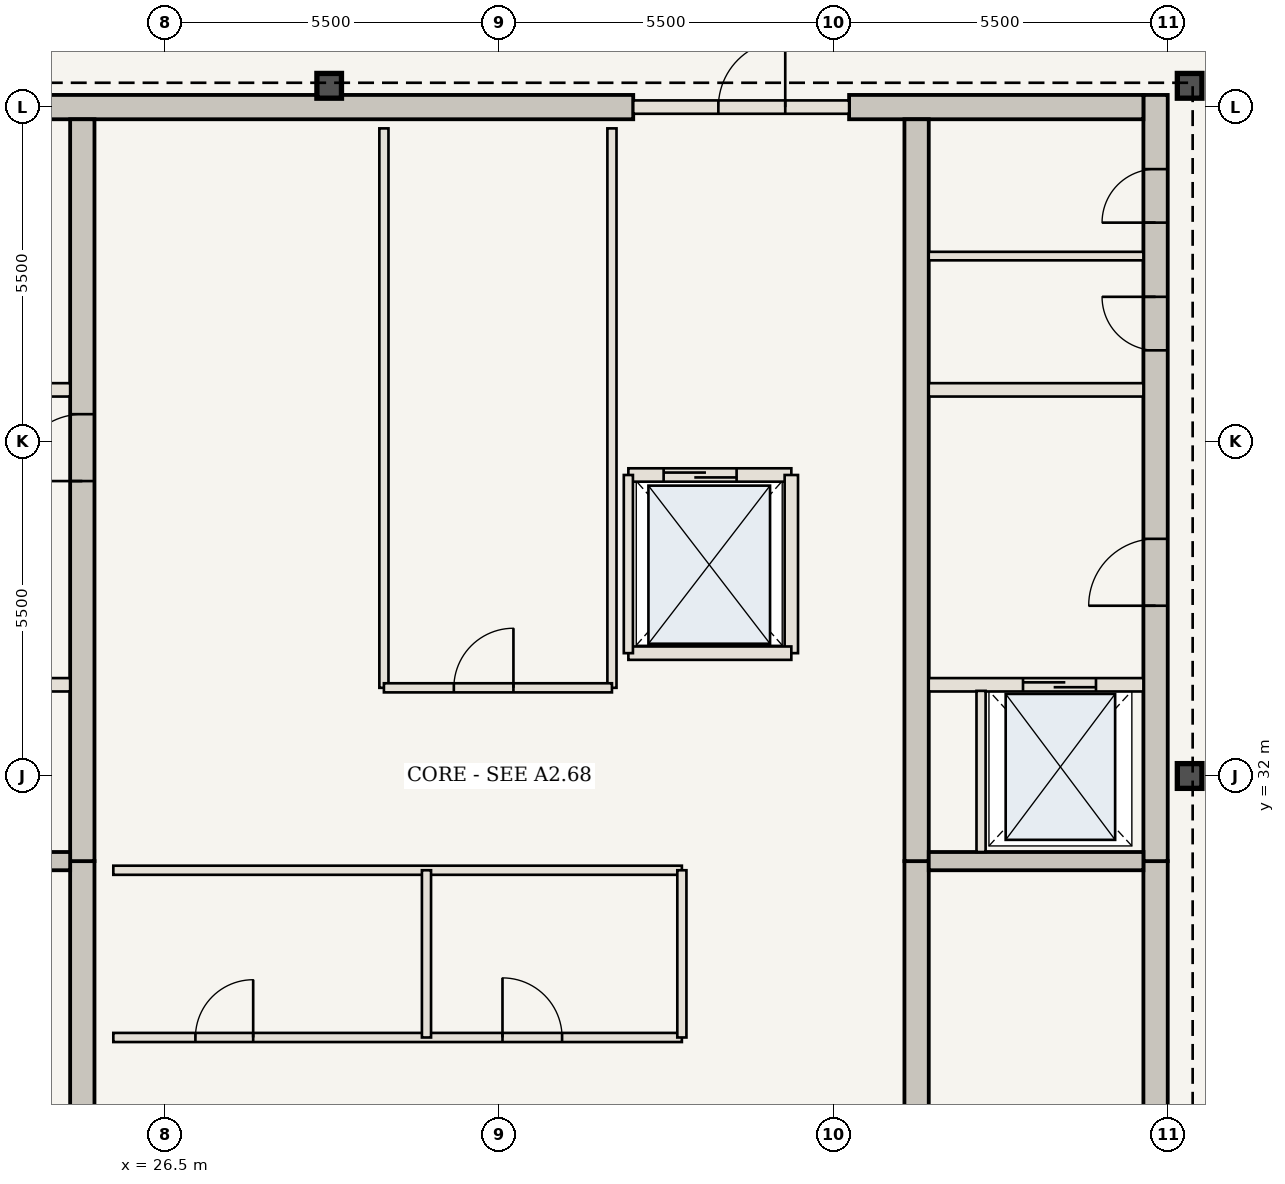
"""IFC4 building model, lengths in metres.
Left out: names, types, materials, properties, quantities, classifications, styles, units other than length and angle.
Written with IfcOpenShell. Run it as: python <this file> out.ifc"""

import sys

from ifc_helpers import new_model, si_unit, direction, frame, frame_2d, origin, origin_2d, place, context, subcontext, project, spatial, rectangle, i_section, extrude, element, fill, save


model = new_model("IFC4")
c1 = context("Model", 3, precision=1e-05, world=origin(), true_north=direction((0.0, 1.0)))
c2 = subcontext(c1, "Body", "Model", "MODEL_VIEW")
j1 = project(units=[si_unit("LENGTHUNIT", "METRE"), si_unit("PLANEANGLEUNIT", "RADIAN")], contexts=[c1])
p1 = place(None, origin())
s1 = spatial("IfcSite", under=j1, at=p1, CompositionType="ELEMENT")
p2 = place(p1, origin())
s2 = spatial("IfcBuilding", under=s1, at=p2, CompositionType="ELEMENT")
p3 = place(p2, frame((0.0, 0.0, 322.35)))
s3 = spatial("IfcBuildingStorey", under=s2, at=p3, CompositionType="ELEMENT", Elevation=322.35)
p4 = place(p3, frame((42.79, 20.75, 0.0), z_axis=(0.0, 0.0, 1.0), x_axis=(0.0, 1.0, 0.0)))
e1 = element("IfcWall", 1, at=p4, inside=s3, PredefinedType="SHEAR", context=c2, shape_type="SweptSolid", body=[
    extrude(rectangle(XDim=9.85, YDim=0.4, at=frame_2d((4.925, 0.0))), origin(), (0.0, 0.0, 1.0), 4.55),
])
p5 = place(p4, frame((1.0, 0.0, 0.0)))
e2 = element("IfcOpeningElement", 2, at=p5, cuts=e1, PredefinedType="OPENING", context=c2, shape_type="SweptSolid", body=[
    extrude(rectangle(XDim=1.15, YDim=2.15, at=frame_2d((0.575, 1.075))), frame((0.0, 0.21, 0.0), z_axis=(0.0, -1.0, 0.0), x_axis=(1.0, 0.0, 0.0)), (0.0, 0.0, 1.0), 0.42),
])
p6 = place(p3, frame((42.79, 30.6, 0.0), z_axis=(0.0, 0.0, 1.0), x_axis=(0.0, 1.0, 0.0)))
e3 = element("IfcWall", 3, at=p6, inside=s3, PredefinedType="SHEAR", context=c2, shape_type="SweptSolid", body=[
    extrude(rectangle(XDim=12.6, YDim=0.4, at=frame_2d((6.3, 0.0))), origin(), (0.0, 0.0, 1.0), 4.55),
])
p7 = place(p6, frame((4.2, 0.0, 0.0)))
e4 = element("IfcOpeningElement", 4, at=p7, cuts=e3, PredefinedType="OPENING", context=c2, shape_type="SweptSolid", body=[
    extrude(rectangle(XDim=1.1, YDim=2.15, at=frame_2d((0.55, 1.075))), frame((0.0, 0.21, 0.0), z_axis=(0.0, -1.0, 0.0), x_axis=(1.0, 0.0, 0.0)), (0.0, 0.0, 1.0), 0.42),
])
p8 = place(p6, frame((8.4, 0.0, 0.0)))
e5 = element("IfcOpeningElement", 5, at=p8, cuts=e3, PredefinedType="OPENING", context=c2, shape_type="SweptSolid", body=[
    extrude(rectangle(XDim=0.88, YDim=2.1, at=frame_2d((0.44, 1.05))), frame((0.0, 0.21, 0.0), z_axis=(0.0, -1.0, 0.0), x_axis=(1.0, 0.0, 0.0)), (0.0, 0.0, 1.0), 0.42),
])
p9 = place(p6, frame((10.5, 0.0, 0.0)))
e6 = element("IfcOpeningElement", 6, at=p9, cuts=e3, PredefinedType="OPENING", context=c2, shape_type="SweptSolid", body=[
    extrude(rectangle(XDim=0.88, YDim=2.1, at=frame_2d((0.44, 1.05))), frame((0.0, 0.21, 0.0), z_axis=(0.0, -1.0, 0.0), x_axis=(1.0, 0.0, 0.0)), (0.0, 0.0, 1.0), 0.42),
])
p10 = place(p3, frame((21.41, 43.0, 0.0), z_axis=(0.0, 0.0, 1.0), x_axis=(1.0, 0.0, 0.0)))
e7 = element("IfcWall", 7, at=p10, inside=s3, PredefinedType="SHEAR", context=c2, shape_type="SweptSolid", body=[
    extrude(rectangle(XDim=12.79, YDim=0.4, at=frame_2d((6.395, 0.0))), origin(), (0.0, 0.0, 1.0), 4.55),
])
p11 = place(p3, frame((37.75, 43.0, 0.0), z_axis=(0.0, 0.0, 1.0), x_axis=(1.0, 0.0, 0.0)))
e8 = element("IfcWall", 8, at=p11, inside=s3, PredefinedType="SHEAR", context=c2, shape_type="SweptSolid", body=[
    extrude(rectangle(XDim=4.84, YDim=0.4, at=frame_2d((2.42, 0.0))), origin(), (0.0, 0.0, 1.0), 4.55),
])
p12 = place(p3, frame((25.14, 21.15, 0.0), z_axis=(0.0, 0.0, 1.0), x_axis=(0.0, 1.0, 0.0)))
e9 = element("IfcWall", 9, at=p12, inside=s3, PredefinedType="SHEAR", context=c2, shape_type="SweptSolid", body=[
    extrude(rectangle(XDim=9.45, YDim=0.4, at=frame_2d((4.725, 0.0))), origin(), (0.0, 0.0, 1.0), 4.55),
])
p13 = place(p3, frame((25.14, 30.6, 0.0), z_axis=(0.0, 0.0, 1.0), x_axis=(0.0, 1.0, 0.0)))
e10 = element("IfcWall", 10, at=p13, inside=s3, PredefinedType="SHEAR", context=c2, shape_type="SweptSolid", body=[
    extrude(rectangle(XDim=12.2, YDim=0.4, at=frame_2d((6.1, 0.0))), origin(), (0.0, 0.0, 1.0), 4.55),
])
p14 = place(p13, frame((6.25, 0.0, 0.0)))
e11 = element("IfcOpeningElement", 11, at=p14, cuts=e10, PredefinedType="OPENING", context=c2, shape_type="SweptSolid", body=[
    extrude(rectangle(XDim=1.1, YDim=2.15, at=frame_2d((0.55, 1.075))), frame((0.0, 0.21, 0.0), z_axis=(0.0, -1.0, 0.0), x_axis=(1.0, 0.0, 0.0)), (0.0, 0.0, 1.0), 0.42),
])
p15 = place(p3, frame((38.86, 21.15, 0.0), z_axis=(0.0, 0.0, 1.0), x_axis=(0.0, 1.0, 0.0)))
e12 = element("IfcWall", 12, at=p15, inside=s3, PredefinedType="SHEAR", context=c2, shape_type="SweptSolid", body=[
    extrude(rectangle(XDim=9.45, YDim=0.4, at=frame_2d((4.725, 0.0))), origin(), (0.0, 0.0, 1.0), 4.55),
])
p16 = place(p3, frame((38.86, 30.6, 0.0), z_axis=(0.0, 0.0, 1.0), x_axis=(0.0, 1.0, 0.0)))
e13 = element("IfcWall", 13, at=p16, inside=s3, PredefinedType="SHEAR", context=c2, shape_type="SweptSolid", body=[
    extrude(rectangle(XDim=12.2, YDim=0.4, at=frame_2d((6.1, 0.0))), origin(), (0.0, 0.0, 1.0), 4.55),
])
for number, where, z_axis, x_axis in (
    (14, (43.35, 32.0, 0.0), (0.0, 0.0, 1.0), (1.0, 0.0, 0.0)),
    (15, (43.35, 43.35, 0.0), (0.0, 0.0, 1.0), (1.0, 0.0, 0.0)),
    (16, (29.2, 43.35, 0.0), (0.0, 0.0, 1.0), (1.0, 0.0, 0.0)),
):
    element("IfcColumn", number, at=place(p3, frame(where, z_axis=z_axis, x_axis=x_axis)), inside=s3, PredefinedType="COLUMN", context=c2, shape_type="SweptSolid", body=[
        extrude(i_section(OverallWidth=0.404, OverallDepth=0.407, WebThickness=0.027, FlangeThickness=0.044, at=origin_2d()), origin(), (0.0, 0.0, 1.0), 4.55),
    ])
for number, where, z_axis, x_axis in (
    (17, (21.41, 30.6, 0.0), (0.0, 0.0, 1.0), (1.0, 0.0, 0.0)),
    (18, (39.06, 30.6, 0.0), (0.0, 0.0, 1.0), (1.0, 0.0, 0.0)),
):
    element("IfcWall", number, at=place(p3, frame(where, z_axis=z_axis, x_axis=x_axis)), inside=s3, PredefinedType="SHEAR", context=c2, shape_type="SweptSolid", body=[
        extrude(rectangle(XDim=3.53, YDim=0.3, at=frame_2d((1.765, 0.0))), origin(), (0.0, 0.0, 1.0), 4.29),
    ])
p17 = place(p3, frame((21.41, 33.5, 0.0), z_axis=(0.0, 0.0, 1.0), x_axis=(1.0, 0.0, 0.0)))
e19 = element("IfcWall", 19, at=p17, inside=s3, PredefinedType="STANDARD", context=c2, shape_type="SweptSolid", body=[
    extrude(rectangle(XDim=3.53, YDim=0.22, at=frame_2d((1.765, 0.0))), origin(), (0.0, 0.0, 1.0), 4.29),
])
p18 = place(p17, frame((0.75, 0.0, 0.0)))
e20 = element("IfcOpeningElement", 20, at=p18, cuts=e19, PredefinedType="OPENING", context=c2, shape_type="SweptSolid", body=[
    extrude(rectangle(XDim=1.2, YDim=2.2, at=frame_2d((0.6, 1.1))), frame((0.0, 0.12, 0.0), z_axis=(0.0, -1.0, 0.0), x_axis=(1.0, 0.0, 0.0)), (0.0, 0.0, 1.0), 0.24),
])
p19 = place(p3, frame((39.06, 33.5, 0.0), z_axis=(0.0, 0.0, 1.0), x_axis=(1.0, 0.0, 0.0)))
e21 = element("IfcWall", 21, at=p19, inside=s3, PredefinedType="STANDARD", context=c2, shape_type="SweptSolid", body=[
    extrude(rectangle(XDim=3.53, YDim=0.22, at=frame_2d((1.765, 0.0))), origin(), (0.0, 0.0, 1.0), 4.29),
])
p20 = place(p19, frame((1.55, 0.0, 0.0)))
e22 = element("IfcOpeningElement", 22, at=p20, cuts=e21, PredefinedType="OPENING", context=c2, shape_type="SweptSolid", body=[
    extrude(rectangle(XDim=1.2, YDim=2.2, at=frame_2d((0.6, 1.1))), frame((0.0, 0.12, 0.0), z_axis=(0.0, -1.0, 0.0), x_axis=(1.0, 0.0, 0.0)), (0.0, 0.0, 1.0), 0.24),
])
p21 = place(p3, frame((39.92, 30.75, 0.0), z_axis=(0.0, 0.0, 1.0), x_axis=(0.0, 1.0, 0.0)))
e23 = element("IfcWall", 23, at=p21, inside=s3, PredefinedType="STANDARD", context=c2, shape_type="SweptSolid", body=[
    extrude(rectangle(XDim=2.65, YDim=0.15, at=frame_2d((1.325, 0.0))), origin(), (0.0, 0.0, 1.0), 4.29),
])
for number, where, z_axis, x_axis in (
    (24, (21.41, 38.35, 0.0), (0.0, 0.0, 1.0), (1.0, 0.0, 0.0)),
    (25, (39.06, 38.35, 0.0), (0.0, 0.0, 1.0), (1.0, 0.0, 0.0)),
):
    element("IfcWall", number, at=place(p3, frame(where, z_axis=z_axis, x_axis=x_axis)), inside=s3, PredefinedType="STANDARD", context=c2, shape_type="SweptSolid", body=[
        extrude(rectangle(XDim=3.53, YDim=0.22, at=frame_2d((1.765, 0.0))), origin(), (0.0, 0.0, 1.0), 4.29),
    ])
p22 = place(p3, frame((39.06, 40.55, 0.0), z_axis=(0.0, 0.0, 1.0), x_axis=(1.0, 0.0, 0.0)))
e26 = element("IfcWall", 26, at=p22, inside=s3, PredefinedType="STANDARD", context=c2, shape_type="SweptSolid", body=[
    extrude(rectangle(XDim=3.53, YDim=0.14, at=frame_2d((1.765, 0.0))), origin(), (0.0, 0.0, 1.0), 4.29),
])
p23 = place(p3, frame((25.65, 27.7, 0.0), z_axis=(0.0, 0.0, 1.0), x_axis=(1.0, 0.0, 0.0)))
e27 = element("IfcWall", 27, at=p23, inside=s3, PredefinedType="STANDARD", context=c2, shape_type="SweptSolid", body=[
    extrude(rectangle(XDim=9.35, YDim=0.15, at=frame_2d((4.675, 0.0))), origin(), (0.0, 0.0, 1.0), 4.29),
])
p24 = place(p23, frame((1.35, 0.0, 0.0)))
e28 = element("IfcOpeningElement", 28, at=p24, cuts=e27, PredefinedType="OPENING", context=c2, shape_type="SweptSolid", body=[
    extrude(rectangle(XDim=0.95, YDim=2.15, at=frame_2d((0.475, 1.075))), frame((0.0, 0.085, 0.0), z_axis=(0.0, -1.0, 0.0), x_axis=(1.0, 0.0, 0.0)), (0.0, 0.0, 1.0), 0.17),
])
p25 = place(p23, frame((6.4, 0.0, 0.0)))
e29 = element("IfcOpeningElement", 29, at=p25, cuts=e27, PredefinedType="OPENING", context=c2, shape_type="SweptSolid", body=[
    extrude(rectangle(XDim=0.98, YDim=2.2, at=frame_2d((0.49, 1.1))), frame((0.0, 0.085, 0.0), z_axis=(0.0, -1.0, 0.0), x_axis=(1.0, 0.0, 0.0)), (0.0, 0.0, 1.0), 0.17),
])
p26 = place(p3, frame((25.65, 30.45, 0.0), z_axis=(0.0, 0.0, 1.0), x_axis=(1.0, 0.0, 0.0)))
e30 = element("IfcWall", 30, at=p26, inside=s3, PredefinedType="STANDARD", context=c2, shape_type="SweptSolid", body=[
    extrude(rectangle(XDim=9.35, YDim=0.15, at=frame_2d((4.675, 0.0))), origin(), (0.0, 0.0, 1.0), 4.29),
])
for number, where, z_axis, x_axis in (
    (31, (30.8, 27.7, 0.0), (0.0, 0.0, 1.0), (0.0, 1.0, 0.0)),
    (32, (35.0, 27.7, 0.0), (0.0, 0.0, 1.0), (0.0, 1.0, 0.0)),
):
    element("IfcWall", number, at=place(p3, frame(where, z_axis=z_axis, x_axis=x_axis)), inside=s3, PredefinedType="STANDARD", context=c2, shape_type="SweptSolid", body=[
        extrude(rectangle(XDim=2.75, YDim=0.15, at=frame_2d((1.375, 0.0))), origin(), (0.0, 0.0, 1.0), 4.29),
    ])
for number, where, z_axis, x_axis in (
    (33, (30.1, 33.45, 0.0), (0.0, 0.0, 1.0), (0.0, 1.0, 0.0)),
    (34, (33.85, 33.45, 0.0), (0.0, 0.0, 1.0), (0.0, 1.0, 0.0)),
):
    element("IfcWall", number, at=place(p3, frame(where, z_axis=z_axis, x_axis=x_axis)), inside=s3, PredefinedType="STANDARD", context=c2, shape_type="SweptSolid", body=[
        extrude(rectangle(XDim=9.2, YDim=0.15, at=frame_2d((4.6, 0.0))), origin(), (0.0, 0.0, 1.0), 4.29),
    ])
p27 = place(p3, frame((30.1, 33.45, 0.0), z_axis=(0.0, 0.0, 1.0), x_axis=(1.0, 0.0, 0.0)))
e35 = element("IfcWall", 35, at=p27, inside=s3, PredefinedType="STANDARD", context=c2, shape_type="SweptSolid", body=[
    extrude(rectangle(XDim=3.75, YDim=0.15, at=frame_2d((1.875, 0.0))), origin(), (0.0, 0.0, 1.0), 4.29),
])
p28 = place(p27, frame((1.15, 0.0, 0.0)))
e36 = element("IfcOpeningElement", 36, at=p28, cuts=e35, PredefinedType="OPENING", context=c2, shape_type="SweptSolid", body=[
    extrude(rectangle(XDim=0.98, YDim=2.2, at=frame_2d((0.49, 1.1))), frame((0.0, 0.085, 0.0), z_axis=(0.0, -1.0, 0.0), x_axis=(1.0, 0.0, 0.0)), (0.0, 0.0, 1.0), 0.17),
])
p29 = place(p3, frame((34.2, 43.0, 0.0), z_axis=(0.0, 0.0, 1.0), x_axis=(1.0, 0.0, 0.0)))
e37 = element("IfcWall", 37, at=p29, inside=s3, PredefinedType="STANDARD", context=c2, shape_type="SweptSolid", body=[
    extrude(rectangle(XDim=3.55, YDim=0.22, at=frame_2d((1.775, 0.0))), origin(), (0.0, 0.0, 1.0), 4.29),
])
p30 = place(p29, frame((1.4, 0.0, 0.0)))
e38 = element("IfcOpeningElement", 38, at=p30, cuts=e37, PredefinedType="OPENING", context=c2, shape_type="SweptSolid", body=[
    extrude(rectangle(XDim=1.1, YDim=2.15, at=frame_2d((0.55, 1.075))), frame((0.0, 0.12, 0.0), z_axis=(0.0, -1.0, 0.0), x_axis=(1.0, 0.0, 0.0)), (0.0, 0.0, 1.0), 0.24),
])
p31 = place(p3, frame((34.12, 36.95, 0.0), z_axis=(0.0, 0.0, 1.0), x_axis=(1.0, 0.0, 0.0)))
e39 = element("IfcWall", 39, at=p31, inside=s3, PredefinedType="STANDARD", context=c2, shape_type="SweptSolid", body=[
    extrude(rectangle(XDim=2.68, YDim=0.22, at=frame_2d((1.34, 0.0))), origin(), (0.0, 0.0, 1.0), 4.29),
])
p32 = place(p31, frame((0.58, 0.0, 0.0)))
e40 = element("IfcOpeningElement", 40, at=p32, cuts=e39, PredefinedType="OPENING", context=c2, shape_type="SweptSolid", body=[
    extrude(rectangle(XDim=1.2, YDim=2.2, at=frame_2d((0.6, 1.1))), frame((0.0, 0.12, 0.0), z_axis=(0.0, -1.0, 0.0), x_axis=(1.0, 0.0, 0.0)), (0.0, 0.0, 1.0), 0.24),
])
p33 = place(p3, frame((36.8, 34.02, 0.0), z_axis=(0.0, 0.0, 1.0), x_axis=(0.0, 1.0, 0.0)))
e41 = element("IfcWall", 41, at=p33, inside=s3, PredefinedType="STANDARD", context=c2, shape_type="SweptSolid", body=[
    extrude(rectangle(XDim=2.93, YDim=0.22, at=frame_2d((1.465, 0.0))), origin(), (0.0, 0.0, 1.0), 4.29),
])
p34 = place(p3, frame((34.12, 34.02, 0.0), z_axis=(0.0, 0.0, 1.0), x_axis=(1.0, 0.0, 0.0)))
e42 = element("IfcWall", 42, at=p34, inside=s3, PredefinedType="STANDARD", context=c2, shape_type="SweptSolid", body=[
    extrude(rectangle(XDim=2.68, YDim=0.22, at=frame_2d((1.34, 0.0))), origin(), (0.0, 0.0, 1.0), 4.29),
])
p35 = place(p3, frame((34.12, 34.02, 0.0), z_axis=(0.0, 0.0, 1.0), x_axis=(0.0, 1.0, 0.0)))
e43 = element("IfcWall", 43, at=p35, inside=s3, PredefinedType="STANDARD", context=c2, shape_type="SweptSolid", body=[
    extrude(rectangle(XDim=2.93, YDim=0.15, at=frame_2d((1.465, 0.0))), origin(), (0.0, 0.0, 1.0), 4.29),
])
p36 = place(p7, origin())
e44 = element("IfcDoor", 44, at=p36, inside=s3, OperationType="SINGLE_SWING_LEFT", PredefinedType="DOOR", context=c2, shape_type="SweptSolid", body=[
    extrude(rectangle(XDim=1.1, YDim=2.15, at=frame_2d((0.55, 1.075))), frame((0.0, 0.025, 0.0), z_axis=(0.0, -1.0, 0.0), x_axis=(1.0, 0.0, 0.0)), (0.0, 0.0, 1.0), 0.05),
])
fill(e4, e44)
p37 = place(p14, origin())
e45 = element("IfcDoor", 45, at=p37, inside=s3, OperationType="SINGLE_SWING_LEFT", PredefinedType="DOOR", context=c2, shape_type="SweptSolid", body=[
    extrude(rectangle(XDim=1.1, YDim=2.15, at=frame_2d((0.55, 1.075))), frame((0.0, 0.025, 0.0), z_axis=(0.0, -1.0, 0.0), x_axis=(1.0, 0.0, 0.0)), (0.0, 0.0, 1.0), 0.05),
])
fill(e11, e45)
p38 = place(p8, origin())
e46 = element("IfcDoor", 46, at=p38, inside=s3, OperationType="SINGLE_SWING_RIGHT", PredefinedType="DOOR", context=c2, shape_type="SweptSolid", body=[
    extrude(rectangle(XDim=0.88, YDim=2.1, at=frame_2d((0.44, 1.05))), frame((0.0, 0.025, 0.0), z_axis=(0.0, -1.0, 0.0), x_axis=(1.0, 0.0, 0.0)), (0.0, 0.0, 1.0), 0.05),
])
fill(e5, e46)
p39 = place(p9, origin())
e47 = element("IfcDoor", 47, at=p39, inside=s3, OperationType="SINGLE_SWING_LEFT", PredefinedType="DOOR", context=c2, shape_type="SweptSolid", body=[
    extrude(rectangle(XDim=0.88, YDim=2.1, at=frame_2d((0.44, 1.05))), frame((0.0, 0.025, 0.0), z_axis=(0.0, -1.0, 0.0), x_axis=(1.0, 0.0, 0.0)), (0.0, 0.0, 1.0), 0.05),
])
fill(e6, e47)
p40 = place(p20, origin())
e48 = element("IfcDoor", 48, at=p40, inside=s3, OperationType="DOUBLE_DOOR_SLIDING", PredefinedType="DOOR", context=c2, shape_type="SweptSolid", body=[
    extrude(rectangle(XDim=1.2, YDim=2.2, at=frame_2d((0.6, 1.1))), frame((0.0, 0.025, 0.0), z_axis=(0.0, -1.0, 0.0), x_axis=(1.0, 0.0, 0.0)), (0.0, 0.0, 1.0), 0.05),
])
fill(e22, e48)
p41 = place(p24, origin())
e49 = element("IfcDoor", 49, at=p41, inside=s3, OperationType="SINGLE_SWING_RIGHT", PredefinedType="DOOR", context=c2, shape_type="SweptSolid", body=[
    extrude(rectangle(XDim=0.95, YDim=2.15, at=frame_2d((0.475, 1.075))), frame((0.0, 0.025, 0.0), z_axis=(0.0, -1.0, 0.0), x_axis=(1.0, 0.0, 0.0)), (0.0, 0.0, 1.0), 0.05),
])
fill(e28, e49)
p42 = place(p25, origin())
e50 = element("IfcDoor", 50, at=p42, inside=s3, OperationType="SINGLE_SWING_LEFT", PredefinedType="DOOR", context=c2, shape_type="SweptSolid", body=[
    extrude(rectangle(XDim=0.98, YDim=2.2, at=frame_2d((0.49, 1.1))), frame((0.0, 0.025, 0.0), z_axis=(0.0, -1.0, 0.0), x_axis=(1.0, 0.0, 0.0)), (0.0, 0.0, 1.0), 0.05),
])
fill(e29, e50)
p43 = place(p28, origin())
e51 = element("IfcDoor", 51, at=p43, inside=s3, OperationType="SINGLE_SWING_RIGHT", PredefinedType="DOOR", context=c2, shape_type="SweptSolid", body=[
    extrude(rectangle(XDim=0.98, YDim=2.2, at=frame_2d((0.49, 1.1))), frame((0.0, 0.025, 0.0), z_axis=(0.0, -1.0, 0.0), x_axis=(1.0, 0.0, 0.0)), (0.0, 0.0, 1.0), 0.05),
])
fill(e36, e51)
p44 = place(p30, origin())
e52 = element("IfcDoor", 52, at=p44, inside=s3, OperationType="SINGLE_SWING_RIGHT", PredefinedType="DOOR", context=c2, shape_type="SweptSolid", body=[
    extrude(rectangle(XDim=1.1, YDim=2.15, at=frame_2d((0.55, 1.075))), frame((0.0, 0.025, 0.0), z_axis=(0.0, -1.0, 0.0), x_axis=(1.0, 0.0, 0.0)), (0.0, 0.0, 1.0), 0.05),
])
fill(e38, e52)
p45 = place(p32, origin())
e53 = element("IfcDoor", 53, at=p45, inside=s3, OperationType="DOUBLE_DOOR_SLIDING", PredefinedType="DOOR", context=c2, shape_type="SweptSolid", body=[
    extrude(rectangle(XDim=1.2, YDim=2.2, at=frame_2d((0.6, 1.1))), frame((0.0, 0.025, 0.0), z_axis=(0.0, -1.0, 0.0), x_axis=(1.0, 0.0, 0.0)), (0.0, 0.0, 1.0), 0.05),
])
fill(e40, e53)
save(model, sys.argv[1])
